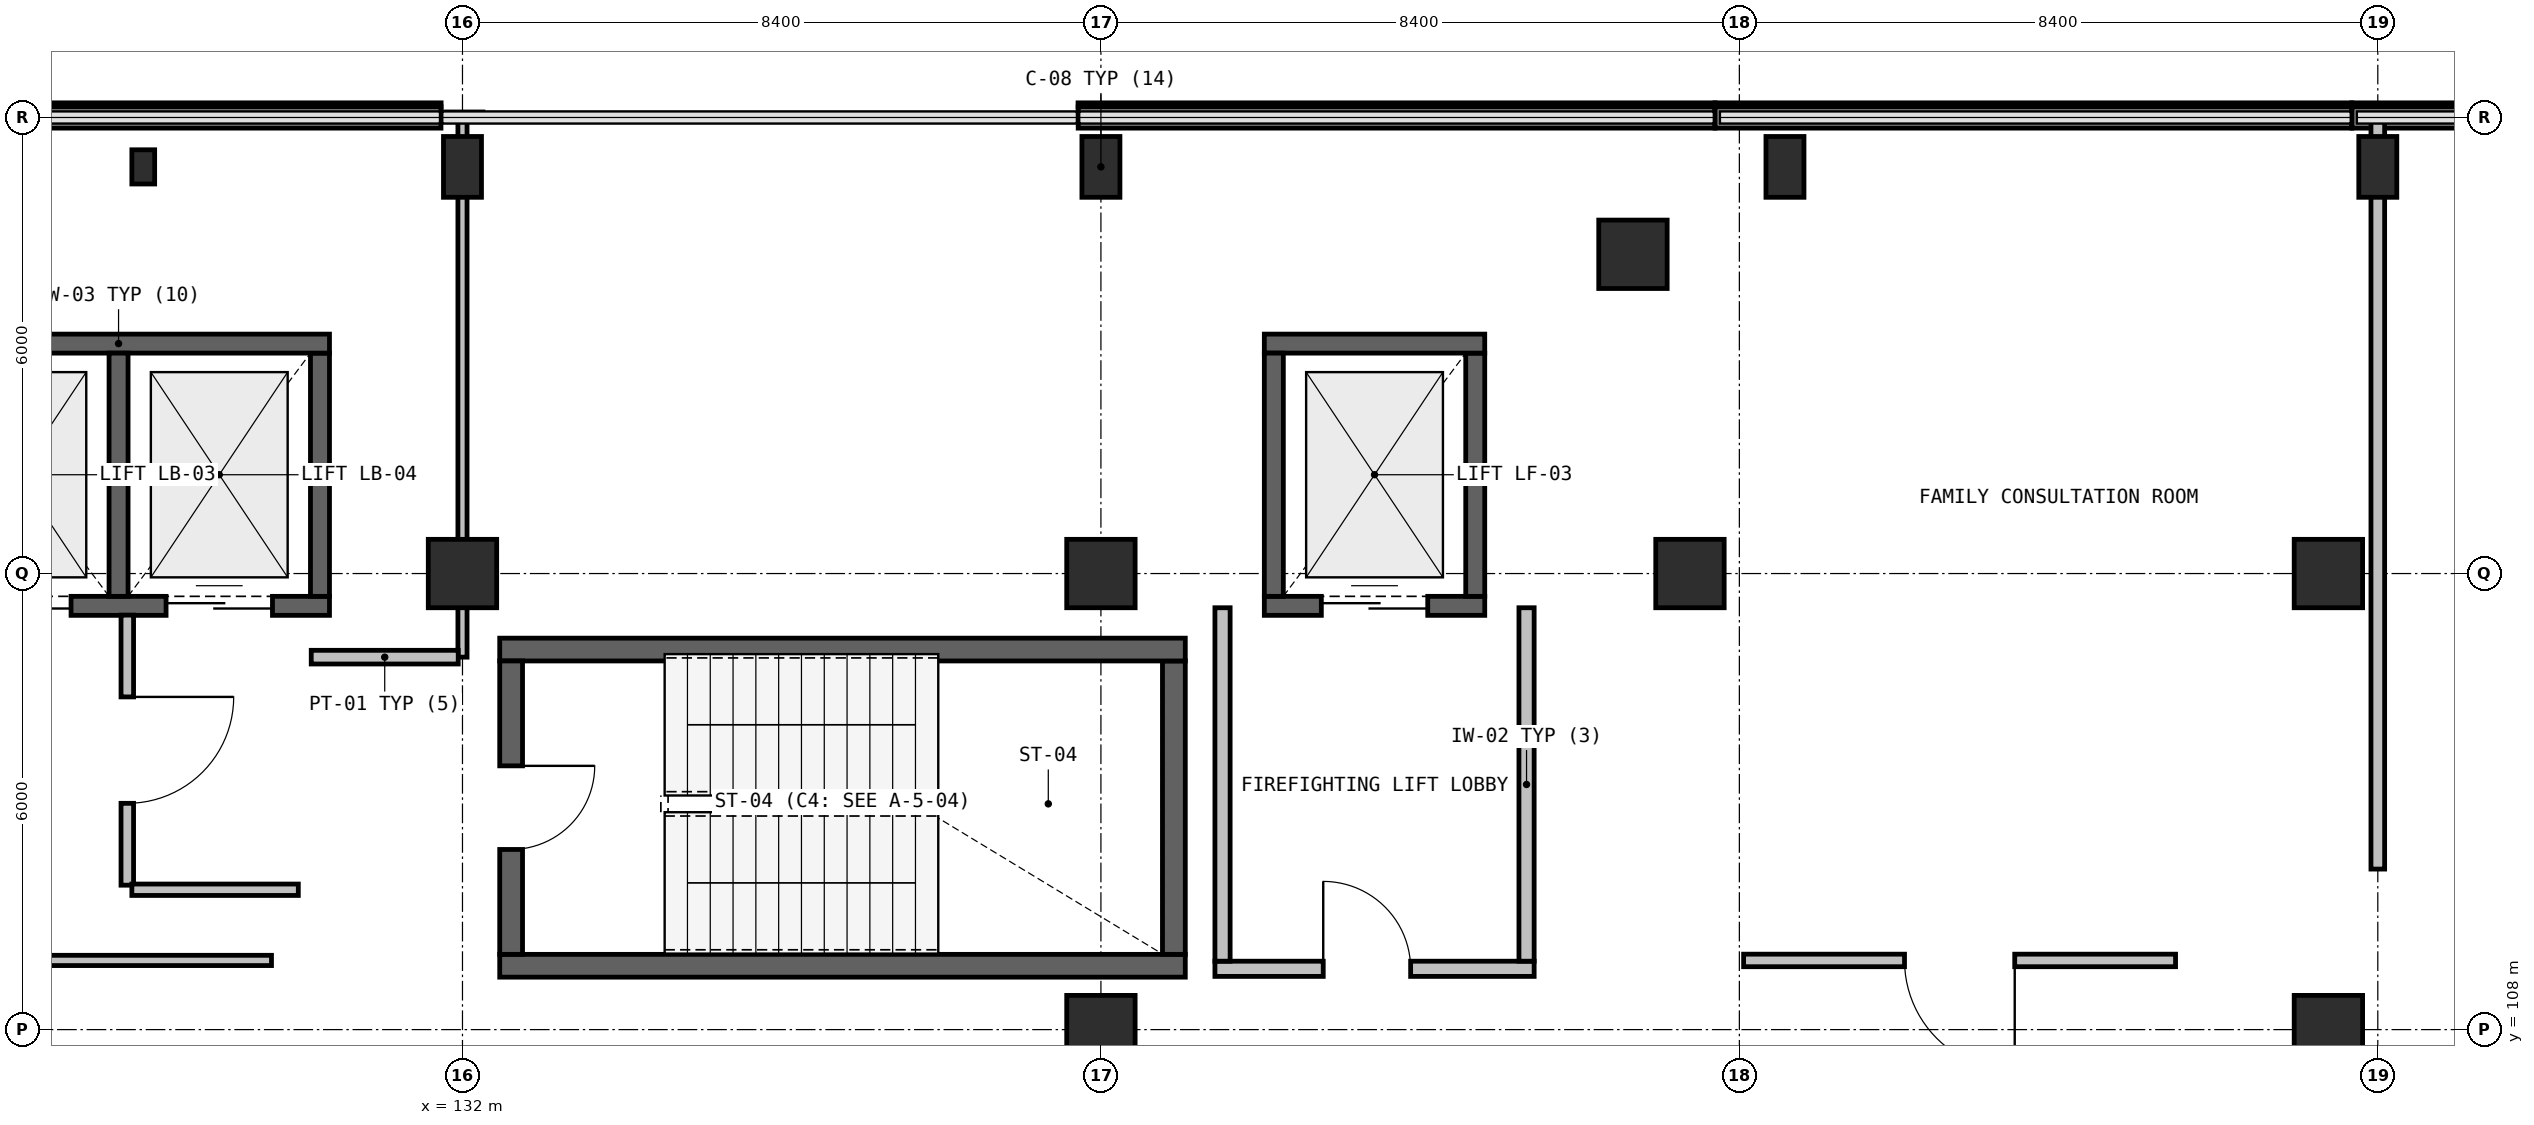
"""IFC4 building model, lengths in metres.
Left out: names, types, materials, properties, quantities, classifications, styles, units other than length and angle.
Written with IfcOpenShell. Run it as: python <this file> out.ifc"""

import sys

from ifc_helpers import new_model, si_unit, direction, frame, frame_2d, origin, origin_2d, place, context, subcontext, project, spatial, rectangle, extrude, element, fill, save


model = new_model("IFC4")
c1 = context("Model", 3, precision=1e-05, world=origin(), true_north=direction((0.0, 1.0)))
c2 = subcontext(c1, "Body", "Model", "MODEL_VIEW")
j1 = project(units=[si_unit("LENGTHUNIT", "METRE"), si_unit("PLANEANGLEUNIT", "RADIAN")], contexts=[c1])
p1 = place(None, origin())
s1 = spatial("IfcSite", under=j1, at=p1, CompositionType="ELEMENT")
p2 = place(p1, origin())
s2 = spatial("IfcBuilding", under=s1, at=p2, CompositionType="ELEMENT")
p3 = place(p2, frame((0.0, 0.0, 5.4)))
s3 = spatial("IfcBuildingStorey", under=s2, at=p3, CompositionType="ELEMENT", Elevation=5.4)
p4 = place(p3, frame((147.4, 118.2, 0.0), z_axis=(0.0, 0.0, 1.0), x_axis=(1.0, 0.0, 0.0)))
e1 = element("IfcColumn", 1, at=p4, inside=s3, PredefinedType="COLUMN", context=c2, shape_type="SweptSolid", body=[
    extrude(rectangle(XDim=0.9, YDim=0.9, at=origin_2d()), origin(), (0.0, 0.0, 1.0), 4.8),
])
for number, where, z_axis, x_axis in (
    (2, (149.4, 119.35, 0.0), (0.0, 0.0, 1.0), (1.0, 0.0, 0.0)),
    (3, (157.2, 119.35, 0.0), (0.0, 0.0, 1.0), (1.0, 0.0, 0.0)),
):
    element("IfcColumn", number, at=place(p3, frame(where, z_axis=z_axis, x_axis=x_axis)), inside=s3, PredefinedType="COLUMN", context=c2, shape_type="SweptSolid", body=[
        extrude(rectangle(XDim=0.5, YDim=0.8, at=origin_2d()), origin(), (0.0, 0.0, 1.0), 4.8),
    ])
p5 = place(p3, frame((132.0, 114.0, 0.0), z_axis=(0.0, 0.0, 1.0), x_axis=(1.0, 0.0, 0.0)))
e4 = element("IfcColumn", 4, at=p5, inside=s3, PredefinedType="COLUMN", context=c2, shape_type="SweptSolid", body=[
    extrude(rectangle(XDim=0.9, YDim=0.9, at=origin_2d()), origin(), (0.0, 0.0, 1.0), 4.8),
])
p6 = place(p3, frame((132.0, 119.35, 0.0), z_axis=(0.0, 0.0, 1.0), x_axis=(1.0, 0.0, 0.0)))
e5 = element("IfcColumn", 5, at=p6, inside=s3, PredefinedType="COLUMN", context=c2, shape_type="SweptSolid", body=[
    extrude(rectangle(XDim=0.5, YDim=0.8, at=origin_2d()), origin(), (0.0, 0.0, 1.0), 4.8),
])
for number, where, z_axis, x_axis in (
    (6, (140.4, 108.0, 0.0), (0.0, 0.0, 1.0), (1.0, 0.0, 0.0)),
    (7, (140.4, 114.0, 0.0), (0.0, 0.0, 1.0), (1.0, 0.0, 0.0)),
):
    element("IfcColumn", number, at=place(p3, frame(where, z_axis=z_axis, x_axis=x_axis)), inside=s3, PredefinedType="COLUMN", context=c2, shape_type="SweptSolid", body=[
        extrude(rectangle(XDim=0.9, YDim=0.9, at=origin_2d()), origin(), (0.0, 0.0, 1.0), 4.8),
    ])
p7 = place(p3, frame((140.4, 119.35, 0.0), z_axis=(0.0, 0.0, 1.0), x_axis=(1.0, 0.0, 0.0)))
e8 = element("IfcColumn", 8, at=p7, inside=s3, PredefinedType="COLUMN", context=c2, shape_type="SweptSolid", body=[
    extrude(rectangle(XDim=0.5, YDim=0.8, at=origin_2d()), origin(), (0.0, 0.0, 1.0), 4.8),
])
for number, where, z_axis, x_axis in (
    (9, (148.15, 114.0, 0.0), (0.0, 0.0, 1.0), (1.0, 0.0, 0.0)),
    (10, (156.55, 108.0, 0.0), (0.0, 0.0, 1.0), (1.0, 0.0, 0.0)),
    (11, (156.55, 114.0, 0.0), (0.0, 0.0, 1.0), (1.0, 0.0, 0.0)),
):
    element("IfcColumn", number, at=place(p3, frame(where, z_axis=z_axis, x_axis=x_axis)), inside=s3, PredefinedType="COLUMN", context=c2, shape_type="SweptSolid", body=[
        extrude(rectangle(XDim=0.9, YDim=0.9, at=origin_2d()), origin(), (0.0, 0.0, 1.0), 4.8),
    ])
p8 = place(p3, frame((127.8, 119.35, 0.0), z_axis=(0.0, 0.0, 1.0), x_axis=(1.0, 0.0, 0.0)))
e12 = element("IfcColumn", 12, at=p8, inside=s3, PredefinedType="PILASTER", context=c2, shape_type="SweptSolid", body=[
    extrude(rectangle(XDim=0.3, YDim=0.45, at=origin_2d()), origin(), (0.0, 0.0, 1.0), 4.445),
])
for number, where, z_axis, x_axis in (
    (13, (123.341, 120.0, 0.0), (0.0, 0.0, 1.0), (1.0, 0.0, 0.0)),
    (14, (140.101, 120.0, 0.0), (0.0, 0.0, 1.0), (1.0, 0.0, 0.0)),
    (15, (148.481, 120.0, 0.0), (0.0, 0.0, 1.0), (1.0, 0.0, 0.0)),
    (16, (156.861, 120.0, 0.0), (0.0, 0.0, 1.0), (1.0, 0.0, 0.0)),
):
    element("IfcWall", number, at=place(p3, frame(where, z_axis=z_axis, x_axis=x_axis)), inside=s3, PredefinedType="SOLIDWALL", context=c2, shape_type="SweptSolid", body=[
        extrude(rectangle(XDim=8.376, YDim=0.28, at=frame_2d((4.188, 0.0))), origin(), (0.0, 0.0, 1.0), 0.94),
    ])
p9 = place(p3, frame((132.49, 108.84, 0.0), z_axis=(0.0, 0.0, 1.0), x_axis=(1.0, 0.0, 0.0)))
e17 = element("IfcWall", 17, at=p9, inside=s3, PredefinedType="SHEAR", context=c2, shape_type="SweptSolid", body=[
    extrude(rectangle(XDim=9.02, YDim=0.3, at=frame_2d((4.51, 0.0))), origin(), (0.0, 0.0, 1.0), 4.445),
])
p10 = place(p3, frame((141.36, 108.99, 0.0), z_axis=(0.0, 0.0, 1.0), x_axis=(0.0, 1.0, 0.0)))
e18 = element("IfcWall", 18, at=p10, inside=s3, PredefinedType="SHEAR", context=c2, shape_type="SweptSolid", body=[
    extrude(rectangle(XDim=3.86, YDim=0.3, at=frame_2d((1.93, 0.0))), origin(), (0.0, 0.0, 1.0), 4.445),
])
p11 = place(p3, frame((141.51, 113.0, 0.0), z_axis=(0.0, 0.0, 1.0), x_axis=(-1.0, 0.0, 0.0)))
e19 = element("IfcWall", 19, at=p11, inside=s3, PredefinedType="SHEAR", context=c2, shape_type="SweptSolid", body=[
    extrude(rectangle(XDim=9.02, YDim=0.3, at=frame_2d((4.51, 0.0))), origin(), (0.0, 0.0, 1.0), 4.445),
])
p12 = place(p3, frame((132.64, 112.85, 0.0), z_axis=(0.0, 0.0, 1.0), x_axis=(0.0, -1.0, 0.0)))
e20 = element("IfcWall", 20, at=p12, inside=s3, PredefinedType="SHEAR", context=c2, shape_type="SweptSolid", body=[
    extrude(rectangle(XDim=3.86, YDim=0.3, at=frame_2d((1.93, 0.0))), origin(), (0.0, 0.0, 1.0), 4.445),
])
p13 = place(p12, frame((1.38, 0.0, 0.0)))
e21 = element("IfcOpeningElement", 21, at=p13, cuts=e20, PredefinedType="OPENING", context=c2, shape_type="SweptSolid", body=[
    extrude(rectangle(XDim=1.1, YDim=2.15, at=frame_2d((0.55, 1.075))), frame((0.0, 0.16, 0.0), z_axis=(0.0, -1.0, 0.0), x_axis=(1.0, 0.0, 0.0)), (0.0, 0.0, 1.0), 0.32),
])
p14 = place(p3, frame((141.9, 108.8, 0.0), z_axis=(0.0, 0.0, 1.0), x_axis=(1.0, 0.0, 0.0)))
e22 = element("IfcWall", 22, at=p14, inside=s3, PredefinedType="SOLIDWALL", context=c2, shape_type="SweptSolid", body=[
    extrude(rectangle(XDim=4.2, YDim=0.2, at=frame_2d((2.1, 0.0))), origin(), (0.0, 0.0, 1.0), 4.445),
])
p15 = place(p14, frame((1.425, 0.0, 0.0)))
e23 = element("IfcOpeningElement", 23, at=p15, cuts=e22, PredefinedType="OPENING", context=c2, shape_type="SweptSolid", body=[
    extrude(rectangle(XDim=1.15, YDim=2.15, at=frame_2d((0.575, 1.075))), frame((0.0, 0.11, 0.0), z_axis=(0.0, -1.0, 0.0), x_axis=(1.0, 0.0, 0.0)), (0.0, 0.0, 1.0), 0.22),
])
for number, where, z_axis, x_axis in (
    (24, (146.0, 108.9, 0.0), (0.0, 0.0, 1.0), (0.0, 1.0, 0.0)),
    (25, (142.0, 113.55, 0.0), (0.0, 0.0, 1.0), (0.0, -1.0, 0.0)),
):
    element("IfcWall", number, at=place(p3, frame(where, z_axis=z_axis, x_axis=x_axis)), inside=s3, PredefinedType="SOLIDWALL", context=c2, shape_type="SweptSolid", body=[
        extrude(rectangle(XDim=4.65, YDim=0.2, at=frame_2d((2.325, 0.0))), origin(), (0.0, 0.0, 1.0), 4.445),
    ])
p16 = place(p3, frame((124.7, 113.575, 0.0), z_axis=(0.0, 0.0, 1.0), x_axis=(1.0, 0.0, 0.0)))
e26 = element("IfcWall", 26, at=p16, inside=s3, PredefinedType="SHEAR", context=c2, shape_type="SweptSolid", body=[
    extrude(rectangle(XDim=5.55, YDim=0.25, at=frame_2d((2.775, 0.0))), origin(), (0.0, 0.0, 1.0), 4.445),
])
p17 = place(p16, frame((0.75, 0.0, 0.0)))
e27 = element("IfcOpeningElement", 27, at=p17, cuts=e26, PredefinedType="OPENING", context=c2, shape_type="SweptSolid", body=[
    extrude(rectangle(XDim=1.4, YDim=2.2, at=frame_2d((0.7, 1.1))), frame((0.0, 0.135, 0.0), z_axis=(0.0, -1.0, 0.0), x_axis=(1.0, 0.0, 0.0)), (0.0, 0.0, 1.0), 0.27),
])
p18 = place(p16, frame((3.4, 0.0, 0.0)))
e28 = element("IfcOpeningElement", 28, at=p18, cuts=e26, PredefinedType="OPENING", context=c2, shape_type="SweptSolid", body=[
    extrude(rectangle(XDim=1.4, YDim=2.2, at=frame_2d((0.7, 1.1))), frame((0.0, 0.135, 0.0), z_axis=(0.0, -1.0, 0.0), x_axis=(1.0, 0.0, 0.0)), (0.0, 0.0, 1.0), 0.27),
])
p19 = place(p3, frame((130.125, 113.7, 0.0), z_axis=(0.0, 0.0, 1.0), x_axis=(0.0, 1.0, 0.0)))
e29 = element("IfcWall", 29, at=p19, inside=s3, PredefinedType="SHEAR", context=c2, shape_type="SweptSolid", body=[
    extrude(rectangle(XDim=3.2, YDim=0.25, at=frame_2d((1.6, 0.0))), origin(), (0.0, 0.0, 1.0), 4.445),
])
p20 = place(p3, frame((130.25, 117.025, 0.0), z_axis=(0.0, 0.0, 1.0), x_axis=(-1.0, 0.0, 0.0)))
e30 = element("IfcWall", 30, at=p20, inside=s3, PredefinedType="SHEAR", context=c2, shape_type="SweptSolid", body=[
    extrude(rectangle(XDim=5.55, YDim=0.25, at=frame_2d((2.775, 0.0))), origin(), (0.0, 0.0, 1.0), 4.445),
])
p21 = place(p3, frame((127.475, 113.7, 0.0), z_axis=(0.0, 0.0, 1.0), x_axis=(0.0, 1.0, 0.0)))
e31 = element("IfcWall", 31, at=p21, inside=s3, PredefinedType="SHEAR", context=c2, shape_type="SweptSolid", body=[
    extrude(rectangle(XDim=3.2, YDim=0.25, at=frame_2d((1.6, 0.0))), origin(), (0.0, 0.0, 1.0), 4.445),
])
p22 = place(p3, frame((142.55, 113.575, 0.0), z_axis=(0.0, 0.0, 1.0), x_axis=(1.0, 0.0, 0.0)))
e32 = element("IfcWall", 32, at=p22, inside=s3, PredefinedType="SHEAR", context=c2, shape_type="SweptSolid", body=[
    extrude(rectangle(XDim=2.9, YDim=0.25, at=frame_2d((1.45, 0.0))), origin(), (0.0, 0.0, 1.0), 4.445),
])
p23 = place(p22, frame((0.75, 0.0, 0.0)))
e33 = element("IfcOpeningElement", 33, at=p23, cuts=e32, PredefinedType="OPENING", context=c2, shape_type="SweptSolid", body=[
    extrude(rectangle(XDim=1.4, YDim=2.15, at=frame_2d((0.7, 1.075))), frame((0.0, 0.135, 0.0), z_axis=(0.0, -1.0, 0.0), x_axis=(1.0, 0.0, 0.0)), (0.0, 0.0, 1.0), 0.27),
])
p24 = place(p3, frame((145.325, 113.7, 0.0), z_axis=(0.0, 0.0, 1.0), x_axis=(0.0, 1.0, 0.0)))
e34 = element("IfcWall", 34, at=p24, inside=s3, PredefinedType="SHEAR", context=c2, shape_type="SweptSolid", body=[
    extrude(rectangle(XDim=3.2, YDim=0.25, at=frame_2d((1.6, 0.0))), origin(), (0.0, 0.0, 1.0), 4.445),
])
p25 = place(p3, frame((145.45, 117.025, 0.0), z_axis=(0.0, 0.0, 1.0), x_axis=(-1.0, 0.0, 0.0)))
e35 = element("IfcWall", 35, at=p25, inside=s3, PredefinedType="SHEAR", context=c2, shape_type="SweptSolid", body=[
    extrude(rectangle(XDim=2.9, YDim=0.25, at=frame_2d((1.45, 0.0))), origin(), (0.0, 0.0, 1.0), 4.445),
])
p26 = place(p3, frame((142.675, 116.9, 0.0), z_axis=(0.0, 0.0, 1.0), x_axis=(0.0, -1.0, 0.0)))
e36 = element("IfcWall", 36, at=p26, inside=s3, PredefinedType="SHEAR", context=c2, shape_type="SweptSolid", body=[
    extrude(rectangle(XDim=3.2, YDim=0.25, at=frame_2d((1.6, 0.0))), origin(), (0.0, 0.0, 1.0), 4.445),
])
p27 = place(p3, frame((132.0, 119.989, 0.0), z_axis=(0.0, 0.0, 1.0), x_axis=(0.0, -1.0, 0.0)))
e37 = element("IfcWall", 37, at=p27, inside=s3, PredefinedType="PARTITIONING", context=c2, shape_type="SweptSolid", body=[
    extrude(rectangle(XDim=7.089, YDim=0.12, at=frame_2d((3.544, 0.0))), origin(), (0.0, 0.0, 1.0), 3.695),
])
p28 = place(p3, frame((131.944, 112.9, 0.0), z_axis=(0.0, 0.0, 1.0), x_axis=(-1.0, 0.0, 0.0)))
e38 = element("IfcWall", 38, at=p28, inside=s3, PredefinedType="PARTITIONING", context=c2, shape_type="SweptSolid", body=[
    extrude(rectangle(XDim=1.934, YDim=0.18, at=frame_2d((0.967, 0.0))), origin(), (0.0, 0.0, 1.0), 4.445),
])
p29 = place(p3, frame((127.59, 113.453, 0.0), z_axis=(0.0, 0.0, 1.0), x_axis=(0.0, -1.0, 0.0)))
e39 = element("IfcWall", 39, at=p29, inside=s3, PredefinedType="PARTITIONING", context=c2, shape_type="SweptSolid", body=[
    extrude(rectangle(XDim=3.553, YDim=0.165, at=frame_2d((1.776, 0.0))), origin(), (0.0, 0.0, 1.0), 4.445),
])
p30 = place(p29, frame((1.076, 0.0, 0.0)))
e40 = element("IfcOpeningElement", 40, at=p30, cuts=e39, PredefinedType="OPENING", context=c2, shape_type="SweptSolid", body=[
    extrude(rectangle(XDim=1.4, YDim=2.15, at=frame_2d((0.7, 1.075))), frame((0.0, 0.093, 0.0), z_axis=(0.0, -1.0, 0.0), x_axis=(1.0, 0.0, 0.0)), (0.0, 0.0, 1.0), 0.185),
])
p31 = place(p3, frame((127.65, 109.84, 0.0), z_axis=(0.0, 0.0, 1.0), x_axis=(1.0, 0.0, 0.0)))
e41 = element("IfcWall", 41, at=p31, inside=s3, PredefinedType="PARTITIONING", context=c2, shape_type="SweptSolid", body=[
    extrude(rectangle(XDim=2.19, YDim=0.15, at=frame_2d((1.095, 0.0))), origin(), (0.0, 0.0, 1.0), 4.445),
])
p32 = place(p3, frame((129.487, 108.91, 0.0), z_axis=(0.0, 0.0, 1.0), x_axis=(-1.0, 0.0, 0.0)))
e42 = element("IfcWall", 42, at=p32, inside=s3, PredefinedType="PARTITIONING", context=c2, shape_type="SweptSolid", body=[
    extrude(rectangle(XDim=3.876, YDim=0.135, at=frame_2d((1.938, 0.0))), origin(), (0.0, 0.0, 1.0), 4.445),
])
p33 = place(p3, frame((157.2, 119.958, 0.0), z_axis=(0.0, 0.0, 1.0), x_axis=(0.0, -1.0, 0.0)))
e43 = element("IfcWall", 43, at=p33, inside=s3, PredefinedType="PARTITIONING", context=c2, shape_type="SweptSolid", body=[
    extrude(rectangle(XDim=9.846, YDim=0.18, at=frame_2d((4.923, 0.0))), origin(), (0.0, 0.0, 1.0), 4.445),
])
p34 = place(p3, frame((154.539, 108.91, 0.0), z_axis=(0.0, 0.0, 1.0), x_axis=(-1.0, 0.0, 0.0)))
e44 = element("IfcWall", 44, at=p34, inside=s3, PredefinedType="PARTITIONING", context=c2, shape_type="SweptSolid", body=[
    extrude(rectangle(XDim=5.683, YDim=0.165, at=frame_2d((2.842, 0.0))), origin(), (0.0, 0.0, 1.0), 4.445),
])
p35 = place(p34, frame((2.116, 0.0, 0.0)))
e45 = element("IfcOpeningElement", 45, at=p35, cuts=e44, PredefinedType="OPENING", context=c2, shape_type="SweptSolid", body=[
    extrude(rectangle(XDim=1.45, YDim=2.15, at=frame_2d((0.725, 1.075))), frame((0.0, 0.093, 0.0), z_axis=(0.0, -1.0, 0.0), x_axis=(1.0, 0.0, 0.0)), (0.0, 0.0, 1.0), 0.185),
])
p36 = place(p13, origin())
e46 = element("IfcDoor", 46, at=p36, inside=s3, OperationType="SINGLE_SWING_RIGHT", PredefinedType="DOOR", context=c2, shape_type="SweptSolid", body=[
    extrude(rectangle(XDim=1.1, YDim=2.15, at=frame_2d((0.55, 1.075))), frame((0.0, 0.025, 0.0), z_axis=(0.0, -1.0, 0.0), x_axis=(1.0, 0.0, 0.0)), (0.0, 0.0, 1.0), 0.05),
])
fill(e21, e46)
p37 = place(p15, origin())
e47 = element("IfcDoor", 47, at=p37, inside=s3, OperationType="SINGLE_SWING_LEFT", PredefinedType="DOOR", context=c2, shape_type="SweptSolid", body=[
    extrude(rectangle(XDim=1.15, YDim=2.15, at=frame_2d((0.575, 1.075))), frame((0.0, 0.025, 0.0), z_axis=(0.0, -1.0, 0.0), x_axis=(1.0, 0.0, 0.0)), (0.0, 0.0, 1.0), 0.05),
])
fill(e23, e47)
p38 = place(p17, origin())
e48 = element("IfcDoor", 48, at=p38, inside=s3, OperationType="DOUBLE_DOOR_SLIDING", PredefinedType="DOOR", context=c2, shape_type="SweptSolid", body=[
    extrude(rectangle(XDim=1.4, YDim=2.2, at=frame_2d((0.7, 1.1))), frame((0.0, 0.025, 0.0), z_axis=(0.0, -1.0, 0.0), x_axis=(1.0, 0.0, 0.0)), (0.0, 0.0, 1.0), 0.05),
])
fill(e27, e48)
p39 = place(p18, origin())
e49 = element("IfcDoor", 49, at=p39, inside=s3, OperationType="DOUBLE_DOOR_SLIDING", PredefinedType="DOOR", context=c2, shape_type="SweptSolid", body=[
    extrude(rectangle(XDim=1.4, YDim=2.2, at=frame_2d((0.7, 1.1))), frame((0.0, 0.025, 0.0), z_axis=(0.0, -1.0, 0.0), x_axis=(1.0, 0.0, 0.0)), (0.0, 0.0, 1.0), 0.05),
])
fill(e28, e49)
p40 = place(p23, origin())
e50 = element("IfcDoor", 50, at=p40, inside=s3, OperationType="DOUBLE_DOOR_SLIDING", PredefinedType="DOOR", context=c2, shape_type="SweptSolid", body=[
    extrude(rectangle(XDim=1.4, YDim=2.15, at=frame_2d((0.7, 1.075))), frame((0.0, 0.025, 0.0), z_axis=(0.0, -1.0, 0.0), x_axis=(1.0, 0.0, 0.0)), (0.0, 0.0, 1.0), 0.05),
])
fill(e33, e50)
p41 = place(p30, origin())
e51 = element("IfcDoor", 51, at=p41, inside=s3, OperationType="SINGLE_SWING_RIGHT", PredefinedType="DOOR", context=c2, shape_type="SweptSolid", body=[
    extrude(rectangle(XDim=1.4, YDim=2.15, at=frame_2d((0.7, 1.075))), frame((0.0, 0.025, 0.0), z_axis=(0.0, -1.0, 0.0), x_axis=(1.0, 0.0, 0.0)), (0.0, 0.0, 1.0), 0.05),
])
fill(e40, e51)
p42 = place(p35, origin())
e52 = element("IfcDoor", 52, at=p42, inside=s3, OperationType="SINGLE_SWING_LEFT", PredefinedType="DOOR", context=c2, shape_type="SweptSolid", body=[
    extrude(rectangle(XDim=1.45, YDim=2.15, at=frame_2d((0.725, 1.075))), frame((0.0, 0.025, 0.0), z_axis=(0.0, -1.0, 0.0), x_axis=(1.0, 0.0, 0.0)), (0.0, 0.0, 1.0), 0.05),
])
fill(e45, e52)
save(model, sys.argv[1])
